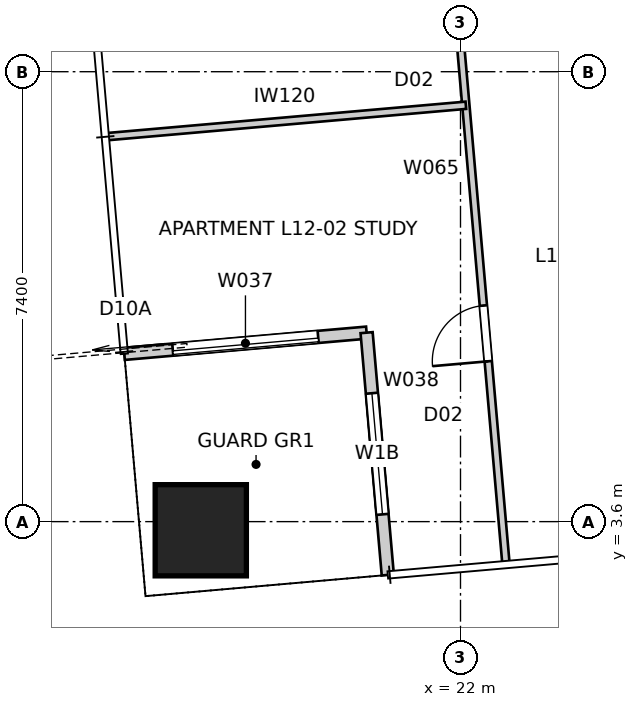
"""IFC4 building model, lengths in metres.
Left out: names, types, materials, properties, quantities, classifications, styles, units other than length and angle.
Written with IfcOpenShell. Run it as: python <this file> out.ifc"""

import sys

from ifc_helpers import new_model, si_unit, direction, frame, frame_2d, origin, origin_2d, place, context, subcontext, project, spatial, rectangle, extrude, element, fill, save


model = new_model("IFC4")
c1 = context("Model", 3, precision=1e-05, world=origin(), true_north=direction((0.0, 1.0)))
c2 = subcontext(c1, "Body", "Model", "MODEL_VIEW")
j1 = project(units=[si_unit("LENGTHUNIT", "METRE"), si_unit("PLANEANGLEUNIT", "RADIAN")], contexts=[c1])
p1 = place(None, origin())
s1 = spatial("IfcSite", under=j1, at=p1, CompositionType="ELEMENT")
p2 = place(p1, origin())
s2 = spatial("IfcBuilding", under=s1, at=p2, CompositionType="ELEMENT")
p3 = place(p2, frame((0.0, 0.0, 47.2)))
s3 = spatial("IfcBuildingStorey", under=s2, at=p3, CompositionType="ELEMENT", Elevation=47.2)
p4 = place(p3, frame((17.729, 3.458, -0.15), z_axis=(0.0, 0.0, 1.0), x_axis=(1.0, 0.0, 0.0)))
e1 = element("IfcColumn", 1, at=p4, inside=s3, PredefinedType="COLUMN", context=c2, shape_type="SweptSolid", body=[
    extrude(rectangle(XDim=1.5, YDim=1.5, at=origin_2d()), origin(), (0.0, 0.0, 1.0), 3.55),
])
p5 = place(p3, frame((16.471, 6.359, 0.0), z_axis=(0.0, 0.0, 1.0), x_axis=(0.99619418125, 0.087161650072, 0.0)))
e2 = element("IfcWall", 2, at=p5, inside=s3, PredefinedType="SOLIDWALL", context=c2, shape_type="SweptSolid", body=[
    extrude(rectangle(XDim=4.0, YDim=0.2, at=frame_2d((2.0, 0.0))), origin(), (0.0, 0.0, 1.0), 3.25),
])
p6 = place(p5, frame((0.8, 0.0, 0.0)))
e3 = element("IfcOpeningElement", 3, at=p6, cuts=e2, PredefinedType="OPENING", context=c2, shape_type="SweptSolid", body=[
    extrude(rectangle(XDim=2.4, YDim=2.1, at=frame_2d((1.2, 1.05))), frame((0.0, 0.11, 0.0), z_axis=(0.0, -1.0, 0.0), x_axis=(1.0, 0.0, 0.0)), (0.0, 0.0, 1.0), 0.22),
])
p7 = place(p3, frame((20.456, 6.708, 0.0), z_axis=(0.0, 0.0, 1.0), x_axis=(0.087156350505, -0.99619464492, 0.0)))
e4 = element("IfcWall", 4, at=p7, inside=s3, PredefinedType="SOLIDWALL", context=c2, shape_type="SweptSolid", body=[
    extrude(rectangle(XDim=4.0, YDim=0.2, at=frame_2d((2.0, 0.0))), origin(), (0.0, 0.0, 1.0), 3.25),
])
p8 = place(p7, frame((1.0, 0.0, 0.45)))
e5 = element("IfcOpeningElement", 5, at=p8, cuts=e4, PredefinedType="OPENING", context=c2, shape_type="SweptSolid", body=[
    extrude(rectangle(XDim=2.0, YDim=1.8, at=frame_2d((1.0, 0.9))), frame((0.0, 0.11, 0.0), z_axis=(0.0, -1.0, 0.0), x_axis=(1.0, 0.0, 0.0)), (0.0, 0.0, 1.0), 0.22),
])
p9 = place(p3, frame((22.745, 2.933, 0.0), z_axis=(0.0, 0.0, 1.0), x_axis=(-0.087152252187, 0.99619500347, 0.0)))
e6 = element("IfcWall", 6, at=p9, inside=s3, PredefinedType="PARTITIONING", context=c2, shape_type="SweptSolid", body=[
    extrude(rectangle(XDim=11.127, YDim=0.12, at=frame_2d((5.563, 0.0))), origin(), (0.0, 0.0, 1.0), 3.25),
])
p10 = place(p9, frame((3.317, 0.0, 0.0)))
e7 = element("IfcOpeningElement", 7, at=p10, cuts=e6, PredefinedType="OPENING", context=c2, shape_type="SweptSolid", body=[
    extrude(rectangle(XDim=0.92, YDim=2.34, at=frame_2d((0.46, 1.17))), frame((0.0, 0.07, 0.0), z_axis=(0.0, -1.0, 0.0), x_axis=(1.0, 0.0, 0.0)), (0.0, 0.0, 1.0), 0.14),
])
p11 = place(p9, frame((8.85, 0.0, 0.0)))
e8 = element("IfcOpeningElement", 8, at=p11, cuts=e6, PredefinedType="OPENING", context=c2, shape_type="SweptSolid", body=[
    extrude(rectangle(XDim=0.92, YDim=2.34, at=frame_2d((0.46, 1.17))), frame((0.0, 0.07, 0.0), z_axis=(0.0, -1.0, 0.0), x_axis=(1.0, 0.0, 0.0)), (0.0, 0.0, 1.0), 0.14),
])
p12 = place(p3, frame((16.198, 9.933, 0.0), z_axis=(0.0, 0.0, 1.0), x_axis=(0.996196451325, 0.087135700879, 0.0)))
e9 = element("IfcWall", 9, at=p12, inside=s3, PredefinedType="PARTITIONING", context=c2, shape_type="SweptSolid", body=[
    extrude(rectangle(XDim=5.912, YDim=0.12, at=frame_2d((2.956, 0.0))), origin(), (0.0, 0.0, 1.0), 3.25),
])
p13 = place(p6, origin())
e10 = element("IfcDoor", 10, at=p13, inside=s3, OperationType="SLIDING_TO_LEFT", PredefinedType="DOOR", context=c2, shape_type="SweptSolid", body=[
    extrude(rectangle(XDim=2.4, YDim=2.1, at=frame_2d((1.2, 1.05))), frame((0.0, 0.025, 0.0), z_axis=(0.0, -1.0, 0.0), x_axis=(1.0, 0.0, 0.0)), (0.0, 0.0, 1.0), 0.05),
])
fill(e3, e10)
p14 = place(p8, origin())
e11 = element("IfcWindow", 11, at=p14, inside=s3, PartitioningType="SINGLE_PANEL", PredefinedType="WINDOW", context=c2, shape_type="SweptSolid", body=[
    extrude(rectangle(XDim=2.0, YDim=1.8, at=frame_2d((1.0, 0.9))), frame((0.0, 0.03, 0.0), z_axis=(0.0, -1.0, 0.0), x_axis=(1.0, 0.0, 0.0)), (0.0, 0.0, 1.0), 0.06),
])
fill(e5, e11)
p15 = place(p10, origin())
e12 = element("IfcDoor", 12, at=p15, inside=s3, OperationType="SINGLE_SWING_LEFT", PredefinedType="DOOR", context=c2, shape_type="SweptSolid", body=[
    extrude(rectangle(XDim=0.92, YDim=2.34, at=frame_2d((0.46, 1.17))), frame((0.0, 0.025, 0.0), z_axis=(0.0, -1.0, 0.0), x_axis=(1.0, 0.0, 0.0)), (0.0, 0.0, 1.0), 0.05),
])
fill(e7, e12)
save(model, sys.argv[1])
